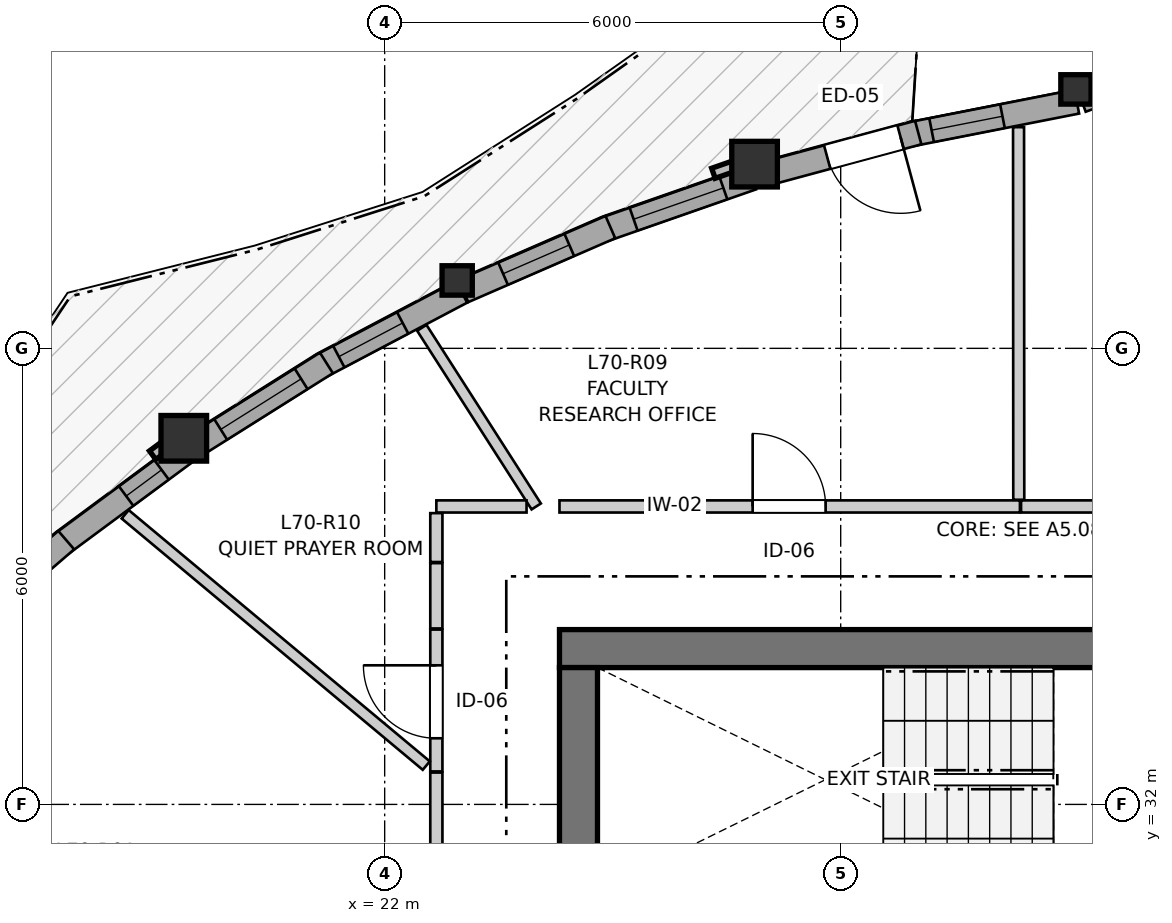
"""IFC4 building model, lengths in metres.
Left out: names, types, materials, properties, quantities, classifications, styles, units other than length and angle.
Written with IfcOpenShell. Run it as: python <this file> out.ifc"""

import sys

from ifc_helpers import new_model, si_unit, direction, frame, frame_2d, origin, origin_2d, place, context, subcontext, project, spatial, rectangle, i_section, extrude, source, transform, mapped, element, fill, save


model = new_model("IFC4")
c1 = context("Model", 3, precision=1e-05, world=origin(), true_north=direction((0.0, 1.0)))
c2 = subcontext(c1, "Body", "Model", "MODEL_VIEW")
j1 = project(units=[si_unit("LENGTHUNIT", "METRE"), si_unit("PLANEANGLEUNIT", "RADIAN")], contexts=[c1])
p1 = place(None, origin())
s1 = spatial("IfcSite", under=j1, at=p1, CompositionType="ELEMENT")
p2 = place(p1, origin())
s2 = spatial("IfcBuilding", under=s1, at=p2, CompositionType="ELEMENT")
p3 = place(p2, frame((0.0, 0.0, 234.0)))
s3 = spatial("IfcBuildingStorey", under=s2, at=p3, CompositionType="ELEMENT", Elevation=234.0)
p4 = place(p3, frame((36.4, 34.05, 0.0), z_axis=(0.0, 0.0, 1.0), x_axis=(-1.0, 0.0, 0.0)))
e1 = element("IfcWall", 1, at=p4, inside=s3, PredefinedType="SHEAR", context=c2, shape_type="SweptSolid", body=[
    extrude(rectangle(XDim=12.1, YDim=0.5, at=frame_2d((6.05, 0.0))), origin(), (0.0, 0.0, 1.0), 2.96),
])
p5 = place(p3, frame((24.55, 33.8, 0.0), z_axis=(0.0, 0.0, 1.0), x_axis=(0.0, -1.0, 0.0)))
e2 = element("IfcWall", 2, at=p5, inside=s3, PredefinedType="SHEAR", context=c2, shape_type="SweptSolid", body=[
    extrude(rectangle(XDim=15.6, YDim=0.5, at=frame_2d((7.8, 0.0))), origin(), (0.0, 0.0, 1.0), 2.96),
])
p6 = place(p5, frame((7.05, 0.0, 0.0)))
e3 = element("IfcOpeningElement", 3, at=p6, cuts=e2, PredefinedType="OPENING", context=c2, shape_type="SweptSolid", body=[
    extrude(rectangle(XDim=1.5, YDim=2.15, at=frame_2d((0.75, 1.075))), frame((0.0, 0.26, 0.0), z_axis=(0.0, -1.0, 0.0), x_axis=(1.0, 0.0, 0.0)), (0.0, 0.0, 1.0), 0.52),
])
p7 = place(p5, frame((3.52, 0.0, 0.0)))
e4 = element("IfcOpeningElement", 4, at=p7, cuts=e2, PredefinedType="OPENING", context=c2, shape_type="SweptSolid", body=[
    extrude(rectangle(XDim=0.86, YDim=2.05, at=frame_2d((0.43, 1.025))), frame((0.0, 0.26, 0.0), z_axis=(0.0, -1.0, 0.0), x_axis=(1.0, 0.0, 0.0)), (0.0, 0.0, 1.0), 0.52),
])
p8 = place(p5, frame((11.22, 0.0, 0.0)))
e5 = element("IfcOpeningElement", 5, at=p8, cuts=e2, PredefinedType="OPENING", context=c2, shape_type="SweptSolid", body=[
    extrude(rectangle(XDim=0.86, YDim=2.05, at=frame_2d((0.43, 1.025))), frame((0.0, 0.26, 0.0), z_axis=(0.0, -1.0, 0.0), x_axis=(1.0, 0.0, 0.0)), (0.0, 0.0, 1.0), 0.52),
])
m1 = source(origin(), c2, "Body", "SweptSolid", [
    extrude(i_section(OverallWidth=0.398, OverallDepth=0.387, WebThickness=0.019, FlangeThickness=0.03, FilletRadius=0.015, at=origin_2d()), origin(), (0.0, 0.0, 1.0), 2.96),
])
p9 = place(p3, frame((31.095, 41.406, 0.0), z_axis=(0.0, 0.0, 1.0), x_axis=(1.0, 0.0, 0.0)))
e6 = element("IfcColumn", 6, at=p9, inside=s3, PredefinedType="PILASTER", context=c2, shape_type="MappedRepresentation", body=[
    mapped(m1, transform((0.0, 0.0, 0.0), x_axis=(1.0, 0.0, 0.0), y_axis=(0.0, 1.0, 0.0), z_axis=(0.0, 0.0, 1.0), scale=1.0)),
])
m2 = source(origin(), c2, "Body", "SweptSolid", [
    extrude(rectangle(XDim=0.6, YDim=0.6, at=origin_2d()), origin(), (0.0, 0.0, 1.0), 2.96),
])
p10 = place(p3, frame((26.867, 40.423, 0.0), z_axis=(0.0, 0.0, 1.0), x_axis=(1.0, 0.0, 0.0)))
e7 = element("IfcColumn", 7, at=p10, inside=s3, PredefinedType="COLUMN", context=c2, shape_type="MappedRepresentation", body=[
    mapped(m2, transform((0.0, 0.0, 0.0), x_axis=(1.0, 0.0, 0.0), y_axis=(0.0, 1.0, 0.0), z_axis=(0.0, 0.0, 1.0), scale=1.0)),
])
p11 = place(p3, frame((22.954, 38.893, 0.0), z_axis=(0.0, 0.0, 1.0), x_axis=(1.0, 0.0, 0.0)))
e8 = element("IfcColumn", 8, at=p11, inside=s3, PredefinedType="PILASTER", context=c2, shape_type="MappedRepresentation", body=[
    mapped(m1, transform((0.0, 0.0, 0.0), x_axis=(1.0, 0.0, 0.0), y_axis=(0.0, 1.0, 0.0), z_axis=(0.0, 0.0, 1.0), scale=1.0)),
])
p12 = place(p3, frame((19.357, 36.817, 0.0), z_axis=(0.0, 0.0, 1.0), x_axis=(1.0, 0.0, 0.0)))
e9 = element("IfcColumn", 9, at=p12, inside=s3, PredefinedType="COLUMN", context=c2, shape_type="MappedRepresentation", body=[
    mapped(m2, transform((0.0, 0.0, 0.0), x_axis=(1.0, 0.0, 0.0), y_axis=(0.0, 1.0, 0.0), z_axis=(0.0, 0.0, 1.0), scale=1.0)),
])
p13 = place(p3, frame((33.078, 41.958, 0.0), z_axis=(0.0, 0.0, 1.0), x_axis=(-0.939730268502, -0.341916689358, 0.0)))
e10 = element("IfcWall", 10, at=p13, inside=s3, PredefinedType="SOLIDWALL", context=c2, shape_type="SweptSolid", body=[
    extrude(rectangle(XDim=2.032, YDim=0.32, at=frame_2d((1.016, 0.0))), origin(), (0.0, 0.0, 1.0), 2.58),
])
p14 = place(p13, frame((0.261, 0.0, 0.82)))
e11 = element("IfcOpeningElement", 11, at=p14, cuts=e10, PredefinedType="OPENING", context=c2, shape_type="SweptSolid", body=[
    extrude(rectangle(XDim=1.45, YDim=1.25, at=frame_2d((0.725, 0.625))), frame((0.0, 0.17, 0.0), z_axis=(0.0, -1.0, 0.0), x_axis=(1.0, 0.0, 0.0)), (0.0, 0.0, 1.0), 0.34),
])
p15 = place(p3, frame((31.106, 41.246, 0.0), z_axis=(0.0, 0.0, 1.0), x_axis=(-0.981245466498, -0.192762378272, 0.0)))
e12 = element("IfcWall", 12, at=p15, inside=s3, PredefinedType="SOLIDWALL", context=c2, shape_type="SweptSolid", body=[
    extrude(rectangle(XDim=2.213, YDim=0.32, at=frame_2d((1.106, 0.0))), origin(), (0.0, 0.0, 1.0), 2.58),
])
p16 = place(p15, frame((0.997, 0.0, 0.82)))
e13 = element("IfcOpeningElement", 13, at=p16, cuts=e12, PredefinedType="OPENING", context=c2, shape_type="SweptSolid", body=[
    extrude(rectangle(XDim=0.95, YDim=1.35, at=frame_2d((0.475, 0.675))), frame((0.0, 0.17, 0.0), z_axis=(0.0, -1.0, 0.0), x_axis=(1.0, 0.0, 0.0)), (0.0, 0.0, 1.0), 0.34),
])
p17 = place(p3, frame((29.02, 40.839, 0.0), z_axis=(0.0, 0.0, 1.0), x_axis=(-0.965482976667, -0.260466162422, 0.0)))
e14 = element("IfcWall", 14, at=p17, inside=s3, PredefinedType="SOLIDWALL", context=c2, shape_type="SweptSolid", body=[
    extrude(rectangle(XDim=2.097, YDim=0.32, at=frame_2d((1.048, 0.0))), origin(), (0.0, 0.0, 1.0), 2.58),
])
p18 = place(p17, frame((0.24, 0.0, 0.0)))
e15 = element("IfcOpeningElement", 15, at=p18, cuts=e14, PredefinedType="OPENING", context=c2, shape_type="SweptSolid", body=[
    extrude(rectangle(XDim=1.0, YDim=2.1, at=frame_2d((0.5, 1.05))), frame((0.0, 0.17, 0.0), z_axis=(0.0, -1.0, 0.0), x_axis=(1.0, 0.0, 0.0)), (0.0, 0.0, 1.0), 0.34),
])
p19 = place(p3, frame((26.834, 40.243, 0.0), z_axis=(0.0, 0.0, 1.0), x_axis=(-0.944112804798, -0.32962252929, 0.0)))
e16 = element("IfcWall", 16, at=p19, inside=s3, PredefinedType="SOLIDWALL", context=c2, shape_type="SweptSolid", body=[
    extrude(rectangle(XDim=2.062, YDim=0.32, at=frame_2d((1.031, 0.0))), origin(), (0.0, 0.0, 1.0), 2.58),
])
p20 = place(p19, frame((0.401, 0.0, 0.82)))
e17 = element("IfcOpeningElement", 17, at=p20, cuts=e16, PredefinedType="OPENING", context=c2, shape_type="SweptSolid", body=[
    extrude(rectangle(XDim=1.25, YDim=1.35, at=frame_2d((0.625, 0.675))), frame((0.0, 0.17, 0.0), z_axis=(0.0, -1.0, 0.0), x_axis=(1.0, 0.0, 0.0)), (0.0, 0.0, 1.0), 0.34),
])
p21 = place(p3, frame((24.969, 39.595, 0.0), z_axis=(0.0, 0.0, 1.0), x_axis=(-0.917071897365, -0.398721876831, 0.0)))
e18 = element("IfcWall", 18, at=p21, inside=s3, PredefinedType="SOLIDWALL", context=c2, shape_type="SweptSolid", body=[
    extrude(rectangle(XDim=2.108, YDim=0.32, at=frame_2d((1.054, 0.0))), origin(), (0.0, 0.0, 1.0), 2.58),
])
p22 = place(p21, frame((0.589, 0.0, 0.82)))
e19 = element("IfcOpeningElement", 19, at=p22, cuts=e18, PredefinedType="OPENING", context=c2, shape_type="SweptSolid", body=[
    extrude(rectangle(XDim=0.95, YDim=1.35, at=frame_2d((0.475, 0.675))), frame((0.0, 0.17, 0.0), z_axis=(0.0, -1.0, 0.0), x_axis=(1.0, 0.0, 0.0)), (0.0, 0.0, 1.0), 0.34),
])
p23 = place(p3, frame((23.011, 38.743, 0.0), z_axis=(0.0, 0.0, 1.0), x_axis=(-0.884356705668, -0.466811757713, 0.0)))
e20 = element("IfcWall", 20, at=p23, inside=s3, PredefinedType="SOLIDWALL", context=c2, shape_type="SweptSolid", body=[
    extrude(rectangle(XDim=2.096, YDim=0.32, at=frame_2d((1.048, 0.0))), origin(), (0.0, 0.0, 1.0), 2.58),
])
p24 = place(p23, frame((0.875, 0.0, 0.82)))
e21 = element("IfcOpeningElement", 21, at=p24, cuts=e20, PredefinedType="OPENING", context=c2, shape_type="SweptSolid", body=[
    extrude(rectangle(XDim=0.95, YDim=1.35, at=frame_2d((0.475, 0.675))), frame((0.0, 0.17, 0.0), z_axis=(0.0, -1.0, 0.0), x_axis=(1.0, 0.0, 0.0)), (0.0, 0.0, 1.0), 0.34),
])
p25 = place(p3, frame((21.233, 37.808, 0.0), z_axis=(0.0, 0.0, 1.0), x_axis=(-0.84640381825, -0.532541619454, 0.0)))
e22 = element("IfcWall", 22, at=p25, inside=s3, PredefinedType="SOLIDWALL", context=c2, shape_type="SweptSolid", body=[
    extrude(rectangle(XDim=2.026, YDim=0.32, at=frame_2d((1.013, 0.0))), origin(), (0.0, 0.0, 1.0), 2.58),
])
p26 = place(p25, frame((0.393, 0.0, 0.82)))
e23 = element("IfcOpeningElement", 23, at=p26, cuts=e22, PredefinedType="OPENING", context=c2, shape_type="SweptSolid", body=[
    extrude(rectangle(XDim=1.25, YDim=1.35, at=frame_2d((0.625, 0.675))), frame((0.0, 0.17, 0.0), z_axis=(0.0, -1.0, 0.0), x_axis=(1.0, 0.0, 0.0)), (0.0, 0.0, 1.0), 0.34),
])
p27 = place(p3, frame((19.38, 36.635, 0.0), z_axis=(0.0, 0.0, 1.0), x_axis=(-0.803849917549, -0.594832169654, 0.0)))
e24 = element("IfcWall", 24, at=p27, inside=s3, PredefinedType="SOLIDWALL", context=c2, shape_type="SweptSolid", body=[
    extrude(rectangle(XDim=2.038, YDim=0.32, at=frame_2d((1.019, 0.0))), origin(), (0.0, 0.0, 1.0), 2.58),
])
p28 = place(p27, frame((0.392, 0.0, 0.82)))
e25 = element("IfcOpeningElement", 25, at=p28, cuts=e24, PredefinedType="OPENING", context=c2, shape_type="SweptSolid", body=[
    extrude(rectangle(XDim=0.58, YDim=1.35, at=frame_2d((0.29, 0.675))), frame((0.0, 0.17, 0.0), z_axis=(0.0, -1.0, 0.0), x_axis=(1.0, 0.0, 0.0)), (0.0, 0.0, 1.0), 0.34),
])
p29 = place(p3, frame((17.81, 35.477, 0.0), z_axis=(0.0, 0.0, 1.0), x_axis=(-0.757507609111, -0.652826333827, 0.0)))
e26 = element("IfcWall", 26, at=p29, inside=s3, PredefinedType="SOLIDWALL", context=c2, shape_type="SweptSolid", body=[
    extrude(rectangle(XDim=2.132, YDim=0.32, at=frame_2d((1.066, 0.0))), origin(), (0.0, 0.0, 1.0), 2.58),
])
p30 = place(p29, frame((0.501, 0.0, 0.82)))
e27 = element("IfcOpeningElement", 27, at=p30, cuts=e26, PredefinedType="OPENING", context=c2, shape_type="SweptSolid", body=[
    extrude(rectangle(XDim=1.15, YDim=1.2, at=frame_2d((0.575, 0.6))), frame((0.0, 0.17, 0.0), z_axis=(0.0, -1.0, 0.0), x_axis=(1.0, 0.0, 0.0)), (0.0, 0.0, 1.0), 0.34),
])
p31 = place(p3, frame((24.3, 35.92, 0.0), z_axis=(0.0, 0.0, 1.0), x_axis=(1.0, 0.0, 0.0)))
e28 = element("IfcWall", 28, at=p31, inside=s3, PredefinedType="PARTITIONING", context=c2, shape_type="SweptSolid", body=[
    extrude(rectangle(XDim=6.058, YDim=0.16, at=frame_2d((3.029, 0.0))), origin(), (0.0, 0.0, 1.0), 2.96),
])
p32 = place(p31, frame((2.542, 0.0, 0.0)))
e29 = element("IfcOpeningElement", 29, at=p32, cuts=e28, PredefinedType="OPENING", context=c2, shape_type="SweptSolid", body=[
    extrude(rectangle(XDim=0.96, YDim=2.1, at=frame_2d((0.48, 1.05))), frame((0.0, 0.09, 0.0), z_axis=(0.0, -1.0, 0.0), x_axis=(1.0, 0.0, 0.0)), (0.0, 0.0, 1.0), 0.18),
])
p33 = place(p3, frame((22.68, 27.85, 0.0), z_axis=(0.0, 0.0, 1.0), x_axis=(0.0, 1.0, 0.0)))
e30 = element("IfcWall", 30, at=p33, inside=s3, PredefinedType="PARTITIONING", context=c2, shape_type="SweptSolid", body=[
    extrude(rectangle(XDim=4.569, YDim=0.16, at=frame_2d((2.284, 0.0))), origin(), (0.0, 0.0, 1.0), 2.96),
])
p34 = place(p33, frame((1.824, 0.0, 0.0)))
e31 = element("IfcOpeningElement", 31, at=p34, cuts=e30, PredefinedType="OPENING", context=c2, shape_type="SweptSolid", body=[
    extrude(rectangle(XDim=0.96, YDim=2.1, at=frame_2d((0.48, 1.05))), frame((0.0, 0.09, 0.0), z_axis=(0.0, -1.0, 0.0), x_axis=(1.0, 0.0, 0.0)), (0.0, 0.0, 1.0), 0.18),
])
p35 = place(p3, frame((30.373, 35.92, 0.0), z_axis=(0.0, 0.0, 1.0), x_axis=(1.0, 0.0, 0.0)))
e32 = element("IfcWall", 32, at=p35, inside=s3, PredefinedType="PARTITIONING", context=c2, shape_type="SweptSolid", body=[
    extrude(rectangle(XDim=3.94, YDim=0.16, at=frame_2d((1.97, 0.0))), origin(), (0.0, 0.0, 1.0), 2.96),
])
p36 = place(p35, frame((1.467, 0.0, 0.0)))
e33 = element("IfcOpeningElement", 33, at=p36, cuts=e32, PredefinedType="OPENING", context=c2, shape_type="SweptSolid", body=[
    extrude(rectangle(XDim=0.96, YDim=2.1, at=frame_2d((0.48, 1.05))), frame((0.0, 0.09, 0.0), z_axis=(0.0, -1.0, 0.0), x_axis=(1.0, 0.0, 0.0)), (0.0, 0.0, 1.0), 0.18),
])
p37 = place(p3, frame((22.68, 32.434, 0.0), z_axis=(0.0, 0.0, 1.0), x_axis=(0.0, 1.0, 0.0)))
e34 = element("IfcWall", 34, at=p37, inside=s3, PredefinedType="PARTITIONING", context=c2, shape_type="SweptSolid", body=[
    extrude(rectangle(XDim=1.866, YDim=0.16, at=frame_2d((0.933, 0.0))), origin(), (0.0, 0.0, 1.0), 2.628),
])
p38 = place(p37, frame((0.436, 0.0, 0.0)))
e35 = element("IfcOpeningElement", 35, at=p38, cuts=e34, PredefinedType="OPENING", context=c2, shape_type="SweptSolid", body=[
    extrude(rectangle(XDim=0.96, YDim=2.1, at=frame_2d((0.48, 1.05))), frame((0.0, 0.09, 0.0), z_axis=(0.0, -1.0, 0.0), x_axis=(1.0, 0.0, 0.0)), (0.0, 0.0, 1.0), 0.18),
])
p39 = place(p3, frame((18.586, 35.817, 0.0), z_axis=(0.0, 0.0, 1.0), x_axis=(0.767767335808, -0.640728739848, 0.0)))
e36 = element("IfcWall", 36, at=p39, inside=s3, PredefinedType="PARTITIONING", context=c2, shape_type="SweptSolid", body=[
    extrude(rectangle(XDim=5.16, YDim=0.145, at=frame_2d((2.58, 0.0))), origin(), (0.0, 0.0, 1.0), 2.96),
])
p40 = place(p3, frame((30.34, 40.91, 0.0), z_axis=(0.0, 0.0, 1.0), x_axis=(0.000597668984, -0.999999821396, 0.0)))
e37 = element("IfcWall", 37, at=p40, inside=s3, PredefinedType="PARTITIONING", context=c2, shape_type="SweptSolid", body=[
    extrude(rectangle(XDim=4.902, YDim=0.145, at=frame_2d((2.451, 0.0))), origin(), (0.0, 0.0, 1.0), 2.96),
])
p41 = place(p3, frame((22.489, 38.27, 0.0), z_axis=(0.0, 0.0, 1.0), x_axis=(0.539324255944, -0.842098181301, 0.0)))
e38 = element("IfcWall", 38, at=p41, inside=s3, PredefinedType="PARTITIONING", context=c2, shape_type="SweptSolid", body=[
    extrude(rectangle(XDim=2.791, YDim=0.145, at=frame_2d((1.396, 0.0))), origin(), (0.0, 0.0, 1.0), 2.96),
])
p42 = place(p3, frame((22.68, 35.92, 0.0), z_axis=(0.0, 0.0, 1.0), x_axis=(1.0, 0.0, 0.0)))
e39 = element("IfcWall", 39, at=p42, inside=s3, PredefinedType="PARTITIONING", context=c2, shape_type="SweptSolid", body=[
    extrude(rectangle(XDim=1.187, YDim=0.16, at=frame_2d((0.593, 0.0))), origin(), (0.0, 0.0, 1.0), 2.96),
])
p43 = place(p3, frame((22.68, 34.315, 0.0), z_axis=(0.0, 0.0, 1.0), x_axis=(0.0, 1.0, 0.0)))
e40 = element("IfcWall", 40, at=p43, inside=s3, PredefinedType="PARTITIONING", context=c2, shape_type="SweptSolid", body=[
    extrude(rectangle(XDim=0.859, YDim=0.16, at=frame_2d((0.43, 0.0))), origin(), (0.0, 0.0, 1.0), 2.96),
])
p44 = place(p3, frame((22.68, 35.189, 0.0), z_axis=(0.0, 0.0, 1.0), x_axis=(0.0, 1.0, 0.0)))
e41 = element("IfcWall", 41, at=p44, inside=s3, PredefinedType="PARTITIONING", context=c2, shape_type="SweptSolid", body=[
    extrude(rectangle(XDim=0.643, YDim=0.16, at=frame_2d((0.322, 0.0))), origin(), (0.0, 0.0, 1.0), 2.96),
])
m3 = source(origin(), c2, "Body", "SweptSolid", [
    extrude(rectangle(XDim=0.95, YDim=1.35, at=frame_2d((0.475, 0.675))), frame((0.0, 0.03, 0.0), z_axis=(0.0, -1.0, 0.0), x_axis=(1.0, 0.0, 0.0)), (0.0, 0.0, 1.0), 0.06),
])
p45 = place(p16, origin())
e42 = element("IfcWindow", 42, at=p45, inside=s3, PartitioningType="SINGLE_PANEL", PredefinedType="WINDOW", context=c2, shape_type="MappedRepresentation", body=[
    mapped(m3, transform((0.0, 0.0, 0.0), x_axis=(1.0, 0.0, 0.0), y_axis=(0.0, 1.0, 0.0), z_axis=(0.0, 0.0, 1.0), scale=1.0)),
])
fill(e13, e42)
m4 = source(origin(), c2, "Body", "SweptSolid", [
    extrude(rectangle(XDim=1.25, YDim=1.35, at=frame_2d((0.625, 0.675))), frame((0.0, 0.03, 0.0), z_axis=(0.0, -1.0, 0.0), x_axis=(1.0, 0.0, 0.0)), (0.0, 0.0, 1.0), 0.06),
])
p46 = place(p20, origin())
e43 = element("IfcWindow", 43, at=p46, inside=s3, PartitioningType="SINGLE_PANEL", PredefinedType="WINDOW", context=c2, shape_type="MappedRepresentation", body=[
    mapped(m4, transform((0.0, 0.0, 0.0), x_axis=(1.0, 0.0, 0.0), y_axis=(0.0, 1.0, 0.0), z_axis=(0.0, 0.0, 1.0), scale=1.0)),
])
fill(e17, e43)
p47 = place(p22, origin())
e44 = element("IfcWindow", 44, at=p47, inside=s3, PartitioningType="SINGLE_PANEL", PredefinedType="WINDOW", context=c2, shape_type="MappedRepresentation", body=[
    mapped(m3, transform((0.0, 0.0, 0.0), x_axis=(1.0, 0.0, 0.0), y_axis=(0.0, 1.0, 0.0), z_axis=(0.0, 0.0, 1.0), scale=1.0)),
])
fill(e19, e44)
p48 = place(p24, origin())
e45 = element("IfcWindow", 45, at=p48, inside=s3, PartitioningType="SINGLE_PANEL", PredefinedType="WINDOW", context=c2, shape_type="MappedRepresentation", body=[
    mapped(m3, transform((0.0, 0.0, 0.0), x_axis=(1.0, 0.0, 0.0), y_axis=(0.0, 1.0, 0.0), z_axis=(0.0, 0.0, 1.0), scale=1.0)),
])
fill(e21, e45)
p49 = place(p26, origin())
e46 = element("IfcWindow", 46, at=p49, inside=s3, PartitioningType="SINGLE_PANEL", PredefinedType="WINDOW", context=c2, shape_type="MappedRepresentation", body=[
    mapped(m4, transform((0.0, 0.0, 0.0), x_axis=(1.0, 0.0, 0.0), y_axis=(0.0, 1.0, 0.0), z_axis=(0.0, 0.0, 1.0), scale=1.0)),
])
fill(e23, e46)
m5 = source(origin(), c2, "Body", "SweptSolid", [
    extrude(rectangle(XDim=0.58, YDim=1.35, at=frame_2d((0.29, 0.675))), frame((0.0, 0.03, 0.0), z_axis=(0.0, -1.0, 0.0), x_axis=(1.0, 0.0, 0.0)), (0.0, 0.0, 1.0), 0.06),
])
p50 = place(p28, origin())
e47 = element("IfcWindow", 47, at=p50, inside=s3, PartitioningType="SINGLE_PANEL", PredefinedType="WINDOW", context=c2, shape_type="MappedRepresentation", body=[
    mapped(m5, transform((0.0, 0.0, 0.0), x_axis=(1.0, 0.0, 0.0), y_axis=(0.0, 1.0, 0.0), z_axis=(0.0, 0.0, 1.0), scale=1.0)),
])
fill(e25, e47)
m6 = source(origin(), c2, "Body", "SweptSolid", [
    extrude(rectangle(XDim=1.0, YDim=2.1, at=frame_2d((0.5, 1.05))), frame((0.0, 0.025, 0.0), z_axis=(0.0, -1.0, 0.0), x_axis=(1.0, 0.0, 0.0)), (0.0, 0.0, 1.0), 0.05),
])
p51 = place(p18, origin())
e48 = element("IfcDoor", 48, at=p51, inside=s3, OperationType="SINGLE_SWING_LEFT", PredefinedType="DOOR", context=c2, shape_type="MappedRepresentation", body=[
    mapped(m6, transform((0.0, 0.0, 0.0), x_axis=(1.0, 0.0, 0.0), y_axis=(0.0, 1.0, 0.0), z_axis=(0.0, 0.0, 1.0), scale=1.0)),
])
fill(e15, e48)
m7 = source(origin(), c2, "Body", "SweptSolid", [
    extrude(rectangle(XDim=0.96, YDim=2.1, at=frame_2d((0.48, 1.05))), frame((0.0, 0.025, 0.0), z_axis=(0.0, -1.0, 0.0), x_axis=(1.0, 0.0, 0.0)), (0.0, 0.0, 1.0), 0.05),
])
p52 = place(p32, origin())
e49 = element("IfcDoor", 49, at=p52, inside=s3, OperationType="SINGLE_SWING_LEFT", PredefinedType="DOOR", context=c2, shape_type="MappedRepresentation", body=[
    mapped(m7, transform((0.0, 0.0, 0.0), x_axis=(1.0, 0.0, 0.0), y_axis=(0.0, 1.0, 0.0), z_axis=(0.0, 0.0, 1.0), scale=1.0)),
])
fill(e29, e49)
p53 = place(p38, origin())
e50 = element("IfcDoor", 50, at=p53, inside=s3, OperationType="SINGLE_SWING_RIGHT", PredefinedType="DOOR", context=c2, shape_type="MappedRepresentation", body=[
    mapped(m7, transform((0.0, 0.0, 0.0), x_axis=(1.0, 0.0, 0.0), y_axis=(0.0, 1.0, 0.0), z_axis=(0.0, 0.0, 1.0), scale=1.0)),
])
fill(e35, e50)
save(model, sys.argv[1])
